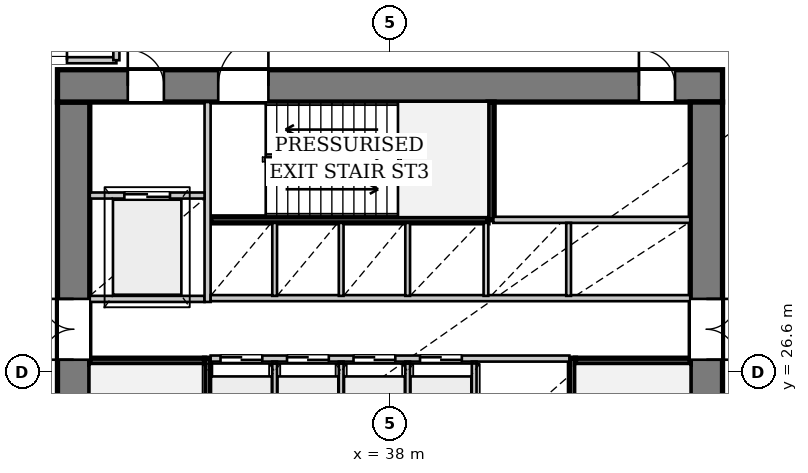
"""IFC4 building model, lengths in metres.
Left out: names, types, materials, properties, quantities, classifications, styles, units other than length and angle.
Written with IfcOpenShell. Run it as: python <this file> out.ifc"""

import sys

from ifc_helpers import new_model, si_unit, direction, frame, frame_2d, origin, place, context, subcontext, project, spatial, rectangle, extrude, source, transform, mapped, element, fill, save


model = new_model("IFC4")
c1 = context("Model", 3, precision=1e-05, world=origin(), true_north=direction((0.0, 1.0)))
c2 = subcontext(c1, "Body", "Model", "MODEL_VIEW")
j1 = project(units=[si_unit("LENGTHUNIT", "METRE"), si_unit("PLANEANGLEUNIT", "RADIAN")], contexts=[c1])
p1 = place(None, origin())
s1 = spatial("IfcSite", under=j1, at=p1, CompositionType="ELEMENT")
p2 = place(p1, origin())
s2 = spatial("IfcBuilding", under=s1, at=p2, CompositionType="ELEMENT")
p3 = place(p2, frame((0.0, 0.0, 20.1)))
s3 = spatial("IfcBuildingStorey", under=s2, at=p3, CompositionType="ELEMENT", Elevation=20.1)
p4 = place(p3, frame((29.675, 19.5, 0.0), z_axis=(0.0, 0.0, 1.0), x_axis=(0.0, 1.0, 0.0)))
e1 = element("IfcWall", 1, at=p4, inside=s3, PredefinedType="SHEAR", context=c2, shape_type="SweptSolid", body=[
    extrude(rectangle(XDim=14.2, YDim=0.85, at=frame_2d((7.1, 0.0))), origin(), (0.0, 0.0, 1.0), 4.08),
])
p5 = place(p4, frame((7.42, 0.0, 0.0)))
e2 = element("IfcOpeningElement", 2, at=p5, cuts=e1, PredefinedType="OPENING", context=c2, shape_type="SweptSolid", body=[
    extrude(rectangle(XDim=1.6, YDim=2.2, at=frame_2d((0.8, 1.1))), frame((0.0, 0.435, 0.0), z_axis=(0.0, -1.0, 0.0), x_axis=(1.0, 0.0, 0.0)), (0.0, 0.0, 1.0), 0.87),
])
p6 = place(p3, frame((29.25, 34.125, 0.0), z_axis=(0.0, 0.0, 1.0), x_axis=(1.0, 0.0, 0.0)))
e3 = element("IfcWall", 3, at=p6, inside=s3, PredefinedType="SHEAR", context=c2, shape_type="SweptSolid", body=[
    extrude(rectangle(XDim=17.5, YDim=0.85, at=frame_2d((8.75, 0.0))), origin(), (0.0, 0.0, 1.0), 4.08),
])
p7 = place(p6, frame((1.85, 0.0, 0.0)))
e4 = element("IfcOpeningElement", 4, at=p7, cuts=e3, PredefinedType="OPENING", context=c2, shape_type="SweptSolid", body=[
    extrude(rectangle(XDim=0.95, YDim=2.1, at=frame_2d((0.475, 1.05))), frame((0.0, 0.435, 0.0), z_axis=(0.0, -1.0, 0.0), x_axis=(1.0, 0.0, 0.0)), (0.0, 0.0, 1.0), 0.87),
])
p8 = place(p6, frame((4.23, 0.0, 0.0)))
e5 = element("IfcOpeningElement", 5, at=p8, cuts=e3, PredefinedType="OPENING", context=c2, shape_type="SweptSolid", body=[
    extrude(rectangle(XDim=1.32, YDim=2.2, at=frame_2d((0.66, 1.1))), frame((0.0, 0.435, 0.0), z_axis=(0.0, -1.0, 0.0), x_axis=(1.0, 0.0, 0.0)), (0.0, 0.0, 1.0), 0.87),
])
p9 = place(p6, frame((15.3, 0.0, 0.0)))
e6 = element("IfcOpeningElement", 6, at=p9, cuts=e3, PredefinedType="OPENING", context=c2, shape_type="SweptSolid", body=[
    extrude(rectangle(XDim=0.95, YDim=2.1, at=frame_2d((0.475, 1.05))), frame((0.0, 0.435, 0.0), z_axis=(0.0, -1.0, 0.0), x_axis=(1.0, 0.0, 0.0)), (0.0, 0.0, 1.0), 0.87),
])
p10 = place(p3, frame((46.325, 33.7, 0.0), z_axis=(0.0, 0.0, 1.0), x_axis=(0.0, -1.0, 0.0)))
e7 = element("IfcWall", 7, at=p10, inside=s3, PredefinedType="SHEAR", context=c2, shape_type="SweptSolid", body=[
    extrude(rectangle(XDim=14.2, YDim=0.85, at=frame_2d((7.1, 0.0))), origin(), (0.0, 0.0, 1.0), 4.08),
])
p11 = place(p10, frame((5.18, 0.0, 0.0)))
e8 = element("IfcOpeningElement", 8, at=p11, cuts=e7, PredefinedType="OPENING", context=c2, shape_type="SweptSolid", body=[
    extrude(rectangle(XDim=1.6, YDim=2.2, at=frame_2d((0.8, 1.1))), frame((0.0, 0.435, 0.0), z_axis=(0.0, -1.0, 0.0), x_axis=(1.0, 0.0, 0.0)), (0.0, 0.0, 1.0), 0.87),
])
p12 = place(p3, frame((33.2, 19.5, 0.0), z_axis=(0.0, 0.0, 1.0), x_axis=(0.0, 1.0, 0.0)))
e9 = element("IfcWall", 9, at=p12, inside=s3, PredefinedType="PARTITIONING", context=c2, shape_type="SweptSolid", body=[
    extrude(rectangle(XDim=7.46, YDim=0.16, at=frame_2d((3.73, 0.0))), origin(), (0.0, 0.0, 1.0), 4.08),
])
p13 = place(p12, frame((0.08, 0.0, 0.0)))
e10 = element("IfcOpeningElement", 10, at=p13, cuts=e9, PredefinedType="OPENING", context=c2, shape_type="SweptSolid", body=[
    extrude(rectangle(XDim=1.32, YDim=2.2, at=frame_2d((0.66, 1.1))), frame((0.0, 0.09, 0.0), z_axis=(0.0, -1.0, 0.0), x_axis=(1.0, 0.0, 0.0)), (0.0, 0.0, 1.0), 0.18),
])
p14 = place(p3, frame((30.1, 26.88, 0.0), z_axis=(0.0, 0.0, 1.0), x_axis=(1.0, 0.0, 0.0)))
e11 = element("IfcWall", 11, at=p14, inside=s3, PredefinedType="PARTITIONING", context=c2, shape_type="SweptSolid", body=[
    extrude(rectangle(XDim=3.02, YDim=0.16, at=frame_2d((1.51, 0.0))), origin(), (0.0, 0.0, 1.0), 4.08),
])
p15 = place(p3, frame((42.8, 26.96, 0.0), z_axis=(0.0, 0.0, 1.0), x_axis=(0.0, -1.0, 0.0)))
e12 = element("IfcWall", 12, at=p15, inside=s3, PredefinedType="PARTITIONING", context=c2, shape_type="SweptSolid", body=[
    extrude(rectangle(XDim=7.46, YDim=0.16, at=frame_2d((3.73, 0.0))), origin(), (0.0, 0.0, 1.0), 4.08),
])
p16 = place(p15, frame((6.06, 0.0, 0.0)))
e13 = element("IfcOpeningElement", 13, at=p16, cuts=e12, PredefinedType="OPENING", context=c2, shape_type="SweptSolid", body=[
    extrude(rectangle(XDim=1.32, YDim=2.2, at=frame_2d((0.66, 1.1))), frame((0.0, 0.09, 0.0), z_axis=(0.0, -1.0, 0.0), x_axis=(1.0, 0.0, 0.0)), (0.0, 0.0, 1.0), 0.18),
])
p17 = place(p3, frame((42.88, 26.88, 0.0), z_axis=(0.0, 0.0, 1.0), x_axis=(1.0, 0.0, 0.0)))
e14 = element("IfcWall", 14, at=p17, inside=s3, PredefinedType="PARTITIONING", context=c2, shape_type="SweptSolid", body=[
    extrude(rectangle(XDim=3.02, YDim=0.16, at=frame_2d((1.51, 0.0))), origin(), (0.0, 0.0, 1.0), 4.08),
])
p18 = place(p3, frame((33.28, 30.6, 0.0), z_axis=(0.0, 0.0, 1.0), x_axis=(1.0, 0.0, 0.0)))
e15 = element("IfcWall", 15, at=p18, inside=s3, PredefinedType="PARTITIONING", context=c2, shape_type="SweptSolid", body=[
    extrude(rectangle(XDim=7.3, YDim=0.16, at=frame_2d((3.65, 0.0))), origin(), (0.0, 0.0, 1.0), 4.08),
])
p19 = place(p3, frame((40.66, 30.6, 0.0), z_axis=(0.0, 0.0, 1.0), x_axis=(0.0, 1.0, 0.0)))
e16 = element("IfcWall", 16, at=p19, inside=s3, PredefinedType="PARTITIONING", context=c2, shape_type="SweptSolid", body=[
    extrude(rectangle(XDim=3.1, YDim=0.16, at=frame_2d((1.55, 0.0))), origin(), (0.0, 0.0, 1.0), 4.08),
])
p20 = place(p3, frame((30.1, 28.52, 0.0), z_axis=(0.0, 0.0, 1.0), x_axis=(1.0, 0.0, 0.0)))
e17 = element("IfcWall", 17, at=p20, inside=s3, PredefinedType="PARTITIONING", context=c2, shape_type="SweptSolid", body=[
    extrude(rectangle(XDim=3.02, YDim=0.16, at=frame_2d((1.51, 0.0))), origin(), (0.0, 0.0, 1.0), 4.08),
])
p21 = place(p3, frame((33.2, 28.44, 0.0), z_axis=(0.0, 0.0, 1.0), x_axis=(0.0, 1.0, 0.0)))
e18 = element("IfcWall", 18, at=p21, inside=s3, PredefinedType="PARTITIONING", context=c2, shape_type="SweptSolid", body=[
    extrude(rectangle(XDim=5.26, YDim=0.16, at=frame_2d((2.63, 0.0))), origin(), (0.0, 0.0, 1.0), 4.08),
])
p22 = place(p3, frame((30.1, 31.24, 0.0), z_axis=(0.0, 0.0, 1.0), x_axis=(1.0, 0.0, 0.0)))
e19 = element("IfcWall", 19, at=p22, inside=s3, PredefinedType="PARTITIONING", context=c2, shape_type="SweptSolid", body=[
    extrude(rectangle(XDim=3.02, YDim=0.16, at=frame_2d((1.51, 0.0))), origin(), (0.0, 0.0, 1.0), 4.08),
])
p23 = place(p22, frame((0.91, 0.0, 0.0)))
e20 = element("IfcOpeningElement", 20, at=p23, cuts=e19, PredefinedType="OPENING", context=c2, shape_type="SweptSolid", body=[
    extrude(rectangle(XDim=1.2, YDim=2.2, at=frame_2d((0.6, 1.1))), frame((0.0, 0.09, 0.0), z_axis=(0.0, -1.0, 0.0), x_axis=(1.0, 0.0, 0.0)), (0.0, 0.0, 1.0), 0.18),
])
p24 = place(p3, frame((33.28, 26.95, 0.0), z_axis=(0.0, 0.0, 1.0), x_axis=(1.0, 0.0, 0.0)))
e21 = element("IfcWall", 21, at=p24, inside=s3, PredefinedType="PARTITIONING", context=c2, shape_type="SweptSolid", body=[
    extrude(rectangle(XDim=9.44, YDim=0.16, at=frame_2d((4.72, 0.0))), origin(), (0.0, 0.0, 1.0), 4.08),
])
p25 = place(p24, frame((0.26, 0.0, 0.0)))
e22 = element("IfcOpeningElement", 22, at=p25, cuts=e21, PredefinedType="OPENING", context=c2, shape_type="SweptSolid", body=[
    extrude(rectangle(XDim=1.1, YDim=2.2, at=frame_2d((0.55, 1.1))), frame((0.0, 0.09, 0.0), z_axis=(0.0, -1.0, 0.0), x_axis=(1.0, 0.0, 0.0)), (0.0, 0.0, 1.0), 0.18),
])
p26 = place(p24, frame((2.01, 0.0, 0.0)))
e23 = element("IfcOpeningElement", 23, at=p26, cuts=e21, PredefinedType="OPENING", context=c2, shape_type="SweptSolid", body=[
    extrude(rectangle(XDim=1.1, YDim=2.2, at=frame_2d((0.55, 1.1))), frame((0.0, 0.09, 0.0), z_axis=(0.0, -1.0, 0.0), x_axis=(1.0, 0.0, 0.0)), (0.0, 0.0, 1.0), 0.18),
])
p27 = place(p24, frame((3.76, 0.0, 0.0)))
e24 = element("IfcOpeningElement", 24, at=p27, cuts=e21, PredefinedType="OPENING", context=c2, shape_type="SweptSolid", body=[
    extrude(rectangle(XDim=1.1, YDim=2.2, at=frame_2d((0.55, 1.1))), frame((0.0, 0.09, 0.0), z_axis=(0.0, -1.0, 0.0), x_axis=(1.0, 0.0, 0.0)), (0.0, 0.0, 1.0), 0.18),
])
p28 = place(p24, frame((5.51, 0.0, 0.0)))
e25 = element("IfcOpeningElement", 25, at=p28, cuts=e21, PredefinedType="OPENING", context=c2, shape_type="SweptSolid", body=[
    extrude(rectangle(XDim=1.1, YDim=2.2, at=frame_2d((0.55, 1.1))), frame((0.0, 0.09, 0.0), z_axis=(0.0, -1.0, 0.0), x_axis=(1.0, 0.0, 0.0)), (0.0, 0.0, 1.0), 0.18),
])
for number, where, z_axis, x_axis in (
    (26, (34.965, 24.56, 0.0), (0.0, 0.0, 1.0), (0.0, 1.0, 0.0)),
    (27, (36.715, 24.56, 0.0), (0.0, 0.0, 1.0), (0.0, 1.0, 0.0)),
    (28, (38.465, 24.56, 0.0), (0.0, 0.0, 1.0), (0.0, 1.0, 0.0)),
    (29, (40.215, 24.56, 0.0), (0.0, 0.0, 1.0), (0.0, 1.0, 0.0)),
):
    element("IfcWall", number, at=place(p3, frame(where, z_axis=z_axis, x_axis=x_axis)), inside=s3, PredefinedType="PARTITIONING", context=c2, shape_type="SweptSolid", body=[
        extrude(rectangle(XDim=2.31, YDim=0.125, at=frame_2d((1.155, 0.0))), origin(), (0.0, 0.0, 1.0), 4.08),
    ])
p29 = place(p3, frame((33.28, 28.54, 0.0), z_axis=(0.0, 0.0, 1.0), x_axis=(1.0, 0.0, 0.0)))
e30 = element("IfcWall", 30, at=p29, inside=s3, PredefinedType="PARTITIONING", context=c2, shape_type="SweptSolid", body=[
    extrude(rectangle(XDim=12.62, YDim=0.16, at=frame_2d((6.31, 0.0))), origin(), (0.0, 0.0, 1.0), 4.08),
])
p30 = place(p3, frame((40.72, 30.6, 0.0), z_axis=(0.0, 0.0, 1.0), x_axis=(1.0, 0.0, 0.0)))
e31 = element("IfcWall", 31, at=p30, inside=s3, PredefinedType="PARTITIONING", context=c2, shape_type="SweptSolid", body=[
    extrude(rectangle(XDim=5.18, YDim=0.16, at=frame_2d((2.59, 0.0))), origin(), (0.0, 0.0, 1.0), 4.08),
])
for number, where, z_axis, x_axis in (
    (32, (34.965, 28.6, 0.0), (0.0, 0.0, 1.0), (0.0, 1.0, 0.0)),
    (33, (36.715, 28.6, 0.0), (0.0, 0.0, 1.0), (0.0, 1.0, 0.0)),
    (34, (38.465, 28.6, 0.0), (0.0, 0.0, 1.0), (0.0, 1.0, 0.0)),
    (35, (40.525, 28.6, 0.0), (0.0, 0.0, 1.0), (0.0, 1.0, 0.0)),
    (36, (42.7, 28.6, 0.0), (0.0, 0.0, 1.0), (0.0, 1.0, 0.0)),
):
    element("IfcWall", number, at=place(p3, frame(where, z_axis=z_axis, x_axis=x_axis)), inside=s3, PredefinedType="PARTITIONING", context=c2, shape_type="SweptSolid", body=[
        extrude(rectangle(XDim=1.92, YDim=0.125, at=frame_2d((0.96, 0.0))), origin(), (0.0, 0.0, 1.0), 4.08),
    ])
p31 = place(p3, frame((24.2, 34.8, 0.0), z_axis=(0.0, 0.0, 1.0), x_axis=(1.0, 0.0, 0.0)))
e37 = element("IfcWall", 37, at=p31, inside=s3, PredefinedType="PARTITIONING", context=c2, shape_type="SweptSolid", body=[
    extrude(rectangle(XDim=6.6, YDim=0.16, at=frame_2d((3.3, 0.0))), origin(), (0.0, 0.0, 1.0), 3.43),
])
p32 = place(p31, frame((1.0, 0.0, 0.0)))
e38 = element("IfcOpeningElement", 38, at=p32, cuts=e37, PredefinedType="OPENING", context=c2, shape_type="SweptSolid", body=[
    extrude(rectangle(XDim=0.9, YDim=2.1, at=frame_2d((0.45, 1.05))), frame((0.0, 0.09, 0.0), z_axis=(0.0, -1.0, 0.0), x_axis=(1.0, 0.0, 0.0)), (0.0, 0.0, 1.0), 0.18),
])
p33 = place(p31, frame((4.4, 0.0, 0.0)))
e39 = element("IfcOpeningElement", 39, at=p33, cuts=e37, PredefinedType="OPENING", context=c2, shape_type="SweptSolid", body=[
    extrude(rectangle(XDim=0.9, YDim=2.1, at=frame_2d((0.45, 1.05))), frame((0.0, 0.09, 0.0), z_axis=(0.0, -1.0, 0.0), x_axis=(1.0, 0.0, 0.0)), (0.0, 0.0, 1.0), 0.18),
])
p34 = place(p3, frame((30.8, 34.8, 0.0), z_axis=(0.0, 0.0, 1.0), x_axis=(0.0, 1.0, 0.0)))
e40 = element("IfcWall", 40, at=p34, inside=s3, PredefinedType="PARTITIONING", context=c2, shape_type="SweptSolid", body=[
    extrude(rectangle(XDim=4.4, YDim=0.16, at=frame_2d((2.2, 0.0))), origin(), (0.0, 0.0, 1.0), 3.43),
])
m1 = source(origin(), c2, "Body", "SweptSolid", [
    extrude(rectangle(XDim=1.6, YDim=2.2, at=frame_2d((0.8, 1.1))), frame((0.0, 0.025, 0.0), z_axis=(0.0, -1.0, 0.0), x_axis=(1.0, 0.0, 0.0)), (0.0, 0.0, 1.0), 0.05),
])
p35 = place(p5, origin())
e41 = element("IfcDoor", 41, at=p35, inside=s3, OperationType="DOUBLE_DOOR_SINGLE_SWING", PredefinedType="DOOR", context=c2, shape_type="MappedRepresentation", body=[
    mapped(m1, transform((0.0, 0.0, 0.0), x_axis=(1.0, 0.0, 0.0), y_axis=(0.0, 1.0, 0.0), z_axis=(0.0, 0.0, 1.0), scale=1.0)),
])
fill(e2, e41)
m2 = source(origin(), c2, "Body", "SweptSolid", [
    extrude(rectangle(XDim=0.95, YDim=2.1, at=frame_2d((0.475, 1.05))), frame((0.0, 0.025, 0.0), z_axis=(0.0, -1.0, 0.0), x_axis=(1.0, 0.0, 0.0)), (0.0, 0.0, 1.0), 0.05),
])
p36 = place(p7, origin())
e42 = element("IfcDoor", 42, at=p36, inside=s3, OperationType="SINGLE_SWING_LEFT", PredefinedType="DOOR", context=c2, shape_type="MappedRepresentation", body=[
    mapped(m2, transform((0.0, 0.0, 0.0), x_axis=(1.0, 0.0, 0.0), y_axis=(0.0, 1.0, 0.0), z_axis=(0.0, 0.0, 1.0), scale=1.0)),
])
fill(e4, e42)
m3 = source(origin(), c2, "Body", "SweptSolid", [
    extrude(rectangle(XDim=1.32, YDim=2.2, at=frame_2d((0.66, 1.1))), frame((0.0, 0.025, 0.0), z_axis=(0.0, -1.0, 0.0), x_axis=(1.0, 0.0, 0.0)), (0.0, 0.0, 1.0), 0.05),
])
p37 = place(p8, origin())
e43 = element("IfcDoor", 43, at=p37, inside=s3, OperationType="SINGLE_SWING_RIGHT", PredefinedType="DOOR", context=c2, shape_type="MappedRepresentation", body=[
    mapped(m3, transform((0.0, 0.0, 0.0), x_axis=(1.0, 0.0, 0.0), y_axis=(0.0, 1.0, 0.0), z_axis=(0.0, 0.0, 1.0), scale=1.0)),
])
fill(e5, e43)
p38 = place(p11, origin())
e44 = element("IfcDoor", 44, at=p38, inside=s3, OperationType="DOUBLE_DOOR_SINGLE_SWING", PredefinedType="DOOR", context=c2, shape_type="MappedRepresentation", body=[
    mapped(m1, transform((0.0, 0.0, 0.0), x_axis=(1.0, 0.0, 0.0), y_axis=(0.0, 1.0, 0.0), z_axis=(0.0, 0.0, 1.0), scale=1.0)),
])
fill(e8, e44)
m4 = source(origin(), c2, "Body", "SweptSolid", [
    extrude(rectangle(XDim=1.2, YDim=2.2, at=frame_2d((0.6, 1.1))), frame((0.0, 0.025, 0.0), z_axis=(0.0, -1.0, 0.0), x_axis=(1.0, 0.0, 0.0)), (0.0, 0.0, 1.0), 0.05),
])
p39 = place(p23, origin())
e45 = element("IfcDoor", 45, at=p39, inside=s3, OperationType="DOUBLE_DOOR_SLIDING", PredefinedType="DOOR", context=c2, shape_type="MappedRepresentation", body=[
    mapped(m4, transform((0.0, 0.0, 0.0), x_axis=(1.0, 0.0, 0.0), y_axis=(0.0, 1.0, 0.0), z_axis=(0.0, 0.0, 1.0), scale=1.0)),
])
fill(e20, e45)
m5 = source(origin(), c2, "Body", "SweptSolid", [
    extrude(rectangle(XDim=1.1, YDim=2.2, at=frame_2d((0.55, 1.1))), frame((0.0, 0.025, 0.0), z_axis=(0.0, -1.0, 0.0), x_axis=(1.0, 0.0, 0.0)), (0.0, 0.0, 1.0), 0.05),
])
p40 = place(p25, origin())
e46 = element("IfcDoor", 46, at=p40, inside=s3, OperationType="DOUBLE_DOOR_SLIDING", PredefinedType="DOOR", context=c2, shape_type="MappedRepresentation", body=[
    mapped(m5, transform((0.0, 0.0, 0.0), x_axis=(1.0, 0.0, 0.0), y_axis=(0.0, 1.0, 0.0), z_axis=(0.0, 0.0, 1.0), scale=1.0)),
])
fill(e22, e46)
p41 = place(p26, origin())
e47 = element("IfcDoor", 47, at=p41, inside=s3, OperationType="DOUBLE_DOOR_SLIDING", PredefinedType="DOOR", context=c2, shape_type="MappedRepresentation", body=[
    mapped(m5, transform((0.0, 0.0, 0.0), x_axis=(1.0, 0.0, 0.0), y_axis=(0.0, 1.0, 0.0), z_axis=(0.0, 0.0, 1.0), scale=1.0)),
])
fill(e23, e47)
p42 = place(p27, origin())
e48 = element("IfcDoor", 48, at=p42, inside=s3, OperationType="DOUBLE_DOOR_SLIDING", PredefinedType="DOOR", context=c2, shape_type="MappedRepresentation", body=[
    mapped(m5, transform((0.0, 0.0, 0.0), x_axis=(1.0, 0.0, 0.0), y_axis=(0.0, 1.0, 0.0), z_axis=(0.0, 0.0, 1.0), scale=1.0)),
])
fill(e24, e48)
p43 = place(p28, origin())
e49 = element("IfcDoor", 49, at=p43, inside=s3, OperationType="DOUBLE_DOOR_SLIDING", PredefinedType="DOOR", context=c2, shape_type="MappedRepresentation", body=[
    mapped(m5, transform((0.0, 0.0, 0.0), x_axis=(1.0, 0.0, 0.0), y_axis=(0.0, 1.0, 0.0), z_axis=(0.0, 0.0, 1.0), scale=1.0)),
])
fill(e25, e49)
p44 = place(p9, origin())
e50 = element("IfcDoor", 50, at=p44, inside=s3, OperationType="SINGLE_SWING_LEFT", PredefinedType="DOOR", context=c2, shape_type="MappedRepresentation", body=[
    mapped(m2, transform((0.0, 0.0, 0.0), x_axis=(1.0, 0.0, 0.0), y_axis=(0.0, 1.0, 0.0), z_axis=(0.0, 0.0, 1.0), scale=1.0)),
])
fill(e6, e50)
m6 = source(origin(), c2, "Body", "SweptSolid", [
    extrude(rectangle(XDim=0.9, YDim=2.1, at=frame_2d((0.45, 1.05))), frame((0.0, 0.025, 0.0), z_axis=(0.0, -1.0, 0.0), x_axis=(1.0, 0.0, 0.0)), (0.0, 0.0, 1.0), 0.05),
])
p45 = place(p33, origin())
e51 = element("IfcDoor", 51, at=p45, inside=s3, OperationType="SINGLE_SWING_RIGHT", PredefinedType="DOOR", context=c2, shape_type="MappedRepresentation", body=[
    mapped(m6, transform((0.0, 0.0, 0.0), x_axis=(1.0, 0.0, 0.0), y_axis=(0.0, 1.0, 0.0), z_axis=(0.0, 0.0, 1.0), scale=1.0)),
])
fill(e39, e51)
save(model, sys.argv[1])
